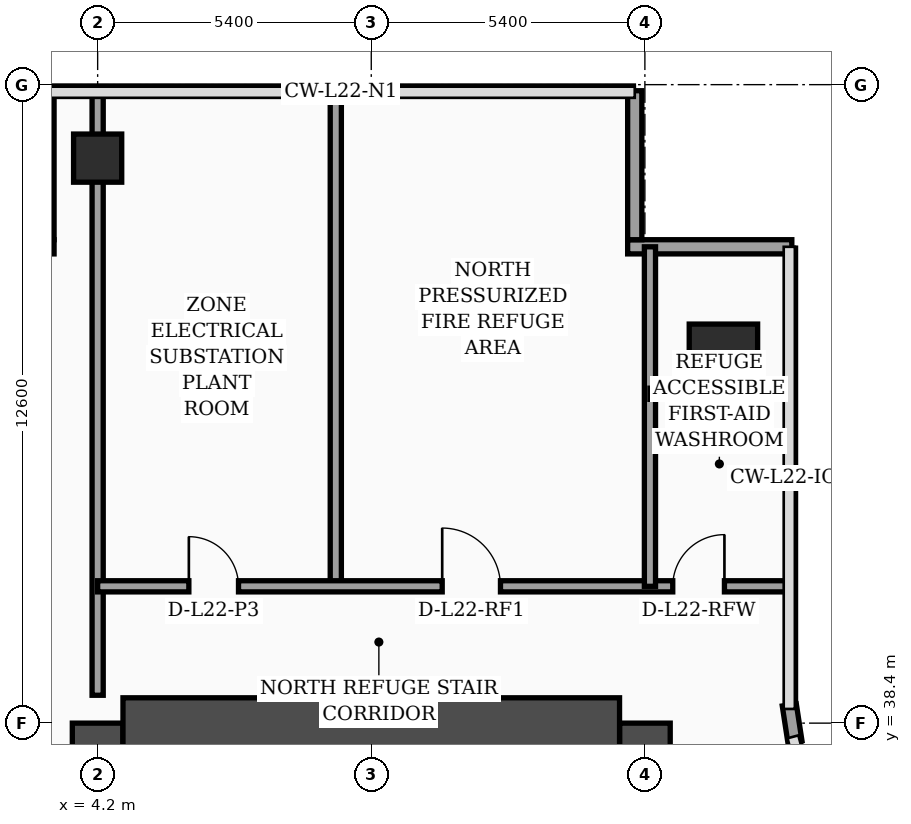
"""IFC4 building model, lengths in metres.
Left out: names, types, materials, properties, quantities, classifications, styles, units other than length and angle.
Written with IfcOpenShell. Run it as: python <this file> out.ifc"""

import sys

from ifc_helpers import new_model, si_unit, direction, frame, frame_2d, origin, origin_2d, place, context, subcontext, project, spatial, rectangle, hollow_rectangle, extrude, element, fill, save


model = new_model("IFC4")
c1 = context("Model", 3, precision=1e-05, world=origin(), true_north=direction((0.0, 1.0)))
c2 = subcontext(c1, "Body", "Model", "MODEL_VIEW")
j1 = project(units=[si_unit("LENGTHUNIT", "METRE"), si_unit("PLANEANGLEUNIT", "RADIAN")], contexts=[c1])
p1 = place(None, origin())
s1 = spatial("IfcSite", under=j1, at=p1, CompositionType="ELEMENT")
p2 = place(p1, origin())
s2 = spatial("IfcBuilding", under=s1, at=p2, CompositionType="ELEMENT")
p3 = place(p2, frame((0.0, 0.0, 92.6)))
s3 = spatial("IfcBuildingStorey", under=s2, at=p3, CompositionType="ELEMENT", Elevation=92.6)
p4 = place(p3, frame((4.2, 16.8, 0.0), z_axis=(0.0, 0.0, 1.0), x_axis=(0.0, 1.0, 0.0)))
e1 = element("IfcWall", 1, at=p4, inside=s3, PredefinedType="SHEAR", context=c2, shape_type="SweptSolid", body=[
    extrude(rectangle(XDim=21.6, YDim=1.0, at=frame_2d((10.8, 0.0))), origin(), (0.0, 0.0, 1.0), 4.35),
])
p5 = place(p3, frame((15.0, 16.8, 0.0), z_axis=(0.0, 0.0, 1.0), x_axis=(0.0, 1.0, 0.0)))
e2 = element("IfcWall", 2, at=p5, inside=s3, PredefinedType="SHEAR", context=c2, shape_type="SweptSolid", body=[
    extrude(rectangle(XDim=21.6, YDim=1.0, at=frame_2d((10.8, 0.0))), origin(), (0.0, 0.0, 1.0), 4.35),
])
p6 = place(p5, frame((8.65, 0.0, 0.0)))
e3 = element("IfcOpeningElement", 3, at=p6, cuts=e2, PredefinedType="OPENING", context=c2, shape_type="SweptSolid", body=[
    extrude(rectangle(XDim=1.1, YDim=2.2, at=frame_2d((0.55, 1.1))), frame((0.0, 0.51, 0.0), z_axis=(0.0, -1.0, 0.0), x_axis=(1.0, 0.0, 0.0)), (0.0, 0.0, 1.0), 1.02),
])
p7 = place(p5, frame((1.25, 0.0, 0.0)))
e4 = element("IfcOpeningElement", 4, at=p7, cuts=e2, PredefinedType="OPENING", context=c2, shape_type="SweptSolid", body=[
    extrude(rectangle(XDim=1.1, YDim=2.2, at=frame_2d((0.55, 1.1))), frame((0.0, 0.51, 0.0), z_axis=(0.0, -1.0, 0.0), x_axis=(1.0, 0.0, 0.0)), (0.0, 0.0, 1.0), 1.02),
])
p8 = place(p5, frame((3.8, 0.0, 0.0)))
e5 = element("IfcOpeningElement", 5, at=p8, cuts=e2, PredefinedType="OPENING", context=c2, shape_type="SweptSolid", body=[
    extrude(rectangle(XDim=1.1, YDim=2.2, at=frame_2d((0.55, 1.1))), frame((0.0, 0.51, 0.0), z_axis=(0.0, -1.0, 0.0), x_axis=(1.0, 0.0, 0.0)), (0.0, 0.0, 1.0), 1.02),
])
p9 = place(p5, frame((6.35, 0.0, 0.0)))
e6 = element("IfcOpeningElement", 6, at=p9, cuts=e2, PredefinedType="OPENING", context=c2, shape_type="SweptSolid", body=[
    extrude(rectangle(XDim=1.1, YDim=2.2, at=frame_2d((0.55, 1.1))), frame((0.0, 0.51, 0.0), z_axis=(0.0, -1.0, 0.0), x_axis=(1.0, 0.0, 0.0)), (0.0, 0.0, 1.0), 1.02),
])
p10 = place(p5, frame((10.85, 0.0, 0.0)))
e7 = element("IfcOpeningElement", 7, at=p10, cuts=e2, PredefinedType="OPENING", context=c2, shape_type="SweptSolid", body=[
    extrude(rectangle(XDim=1.1, YDim=2.2, at=frame_2d((0.55, 1.1))), frame((0.0, 0.51, 0.0), z_axis=(0.0, -1.0, 0.0), x_axis=(1.0, 0.0, 0.0)), (0.0, 0.0, 1.0), 1.02),
])
p11 = place(p5, frame((13.5, 0.0, 0.0)))
e8 = element("IfcOpeningElement", 8, at=p11, cuts=e2, PredefinedType="OPENING", context=c2, shape_type="SweptSolid", body=[
    extrude(rectangle(XDim=1.1, YDim=2.2, at=frame_2d((0.55, 1.1))), frame((0.0, 0.51, 0.0), z_axis=(0.0, -1.0, 0.0), x_axis=(1.0, 0.0, 0.0)), (0.0, 0.0, 1.0), 1.02),
])
p12 = place(p5, frame((16.15, 0.0, 0.0)))
e9 = element("IfcOpeningElement", 9, at=p12, cuts=e2, PredefinedType="OPENING", context=c2, shape_type="SweptSolid", body=[
    extrude(rectangle(XDim=1.1, YDim=2.2, at=frame_2d((0.55, 1.1))), frame((0.0, 0.51, 0.0), z_axis=(0.0, -1.0, 0.0), x_axis=(1.0, 0.0, 0.0)), (0.0, 0.0, 1.0), 1.02),
])
p13 = place(p3, frame((4.7, 38.4, 0.0), z_axis=(0.0, 0.0, 1.0), x_axis=(1.0, 0.0, 0.0)))
e10 = element("IfcWall", 10, at=p13, inside=s3, PredefinedType="SHEAR", context=c2, shape_type="SweptSolid", body=[
    extrude(rectangle(XDim=9.8, YDim=1.0, at=frame_2d((4.9, 0.0))), origin(), (0.0, 0.0, 1.0), 4.35),
])
p14 = place(p3, frame((4.2, 49.55, 0.0), z_axis=(0.0, 0.0, 1.0), x_axis=(1.0, 0.0, 0.0)))
e11 = element("IfcColumn", 11, at=p14, inside=s3, PredefinedType="COLUMN", context=c2, shape_type="SweptSolid", body=[
    extrude(hollow_rectangle(XDim=0.95, YDim=0.95, WallThickness=0.04, at=origin_2d()), origin(), (0.0, 0.0, 1.0), 4.35),
])
p15 = place(p3, frame((16.55, 45.6, 0.0), z_axis=(0.0, 0.0, 1.0), x_axis=(1.0, 0.0, 0.0)))
e12 = element("IfcColumn", 12, at=p15, inside=s3, PredefinedType="COLUMN", context=c2, shape_type="SweptSolid", body=[
    extrude(rectangle(XDim=1.35, YDim=1.35, at=origin_2d()), origin(), (0.0, 0.0, 1.0), 4.35),
])
p16 = place(p3, frame((17.962, 38.03, 0.0), z_axis=(0.0, 0.0, 1.0), x_axis=(-0.15141125477, 0.988470855377, 0.0)))
e13 = element("IfcWall", 13, at=p16, inside=s3, PredefinedType="SOLIDWALL", context=c2, shape_type="SweptSolid", body=[
    extrude(rectangle(XDim=0.739, YDim=0.28, at=frame_2d((0.369, 0.0))), origin(), (0.0, 0.0, 1.0), 4.35),
])
p17 = place(p3, frame((17.9, 47.8, 0.0), z_axis=(0.0, 0.0, 1.0), x_axis=(-1.0, 0.0, 0.0)))
e14 = element("IfcWall", 14, at=p17, inside=s3, PredefinedType="SOLIDWALL", context=c2, shape_type="SweptSolid", body=[
    extrude(rectangle(XDim=3.24, YDim=0.28, at=frame_2d((1.62, 0.0))), origin(), (0.0, 0.0, 1.0), 4.35),
])
p18 = place(p3, frame((14.8, 47.94, 0.0), z_axis=(0.0, 0.0, 1.0), x_axis=(0.0, 1.0, 0.0)))
e15 = element("IfcWall", 15, at=p18, inside=s3, PredefinedType="SOLIDWALL", context=c2, shape_type="SweptSolid", body=[
    extrude(rectangle(XDim=2.94, YDim=0.28, at=frame_2d((1.47, 0.0))), origin(), (0.0, 0.0, 1.0), 4.35),
])
p19 = place(p3, frame((3.2, 50.88, 0.0), z_axis=(0.0, 0.0, 1.0), x_axis=(0.0, -1.0, 0.0)))
e16 = element("IfcWall", 16, at=p19, inside=s3, PredefinedType="SOLIDWALL", context=c2, shape_type="SweptSolid", body=[
    extrude(rectangle(XDim=2.94, YDim=0.28, at=frame_2d((1.47, 0.0))), origin(), (0.0, 0.0, 1.0), 3.85),
])
p20 = place(p3, frame((3.34, 47.8, 0.0), z_axis=(0.0, 0.0, 1.0), x_axis=(-1.0, 0.0, 0.0)))
e17 = element("IfcWall", 17, at=p20, inside=s3, PredefinedType="SOLIDWALL", context=c2, shape_type="SweptSolid", body=[
    extrude(rectangle(XDim=3.22, YDim=0.28, at=frame_2d((1.61, 0.0))), origin(), (0.0, 0.0, 1.0), 3.85),
])
p21 = place(p3, frame((4.2, 38.95, 0.0), z_axis=(0.0, 0.0, 1.0), x_axis=(0.0, 1.0, 0.0)))
e18 = element("IfcWall", 18, at=p21, inside=s3, PredefinedType="SOLIDWALL", context=c2, shape_type="SweptSolid", body=[
    extrude(rectangle(XDim=11.99, YDim=0.22, at=frame_2d((5.995, 0.0))), origin(), (0.0, 0.0, 1.0), 3.65),
])
p22 = place(p3, frame((8.9, 41.1, 0.0), z_axis=(0.0, 0.0, 1.0), x_axis=(0.0, 1.0, 0.0)))
e19 = element("IfcWall", 19, at=p22, inside=s3, PredefinedType="SOLIDWALL", context=c2, shape_type="SweptSolid", body=[
    extrude(rectangle(XDim=9.84, YDim=0.22, at=frame_2d((4.92, 0.0))), origin(), (0.0, 0.0, 1.0), 3.85),
])
p23 = place(p3, frame((4.2, 41.1, 0.0), z_axis=(0.0, 0.0, 1.0), x_axis=(1.0, 0.0, 0.0)))
e20 = element("IfcWall", 20, at=p23, inside=s3, PredefinedType="SOLIDWALL", context=c2, shape_type="SweptSolid", body=[
    extrude(rectangle(XDim=13.65, YDim=0.22, at=frame_2d((6.825, 0.0))), origin(), (0.0, 0.0, 1.0), 3.65),
])
p24 = place(p23, frame((1.8, 0.0, 0.0)))
e21 = element("IfcOpeningElement", 21, at=p24, cuts=e20, PredefinedType="OPENING", context=c2, shape_type="SweptSolid", body=[
    extrude(rectangle(XDim=0.98, YDim=2.15, at=frame_2d((0.49, 1.075))), frame((0.0, 0.12, 0.0), z_axis=(0.0, -1.0, 0.0), x_axis=(1.0, 0.0, 0.0)), (0.0, 0.0, 1.0), 0.24),
])
p25 = place(p23, frame((6.8, 0.0, 0.0)))
e22 = element("IfcOpeningElement", 22, at=p25, cuts=e20, PredefinedType="OPENING", context=c2, shape_type="SweptSolid", body=[
    extrude(rectangle(XDim=1.15, YDim=2.2, at=frame_2d((0.575, 1.1))), frame((0.0, 0.12, 0.0), z_axis=(0.0, -1.0, 0.0), x_axis=(1.0, 0.0, 0.0)), (0.0, 0.0, 1.0), 0.24),
])
p26 = place(p23, frame((11.35, 0.0, 0.0)))
e23 = element("IfcOpeningElement", 23, at=p26, cuts=e20, PredefinedType="OPENING", context=c2, shape_type="SweptSolid", body=[
    extrude(rectangle(XDim=1.02, YDim=2.2, at=frame_2d((0.51, 1.1))), frame((0.0, 0.12, 0.0), z_axis=(0.0, -1.0, 0.0), x_axis=(1.0, 0.0, 0.0)), (0.0, 0.0, 1.0), 0.24),
])
p27 = place(p3, frame((15.1, 41.1, 0.0), z_axis=(0.0, 0.0, 1.0), x_axis=(0.0, 1.0, 0.0)))
e24 = element("IfcWall", 24, at=p27, inside=s3, PredefinedType="SOLIDWALL", context=c2, shape_type="SweptSolid", body=[
    extrude(rectangle(XDim=6.7, YDim=0.22, at=frame_2d((3.35, 0.0))), origin(), (0.0, 0.0, 1.0), 3.65),
])
p28 = place(p3, frame((15.1, 44.9, 0.0), z_axis=(0.0, 0.0, 1.0), x_axis=(1.0, 0.0, 0.0)))
e25 = element("IfcWall", 25, at=p28, inside=s3, PredefinedType="SOLIDWALL", context=c2, shape_type="SweptSolid", body=[
    extrude(rectangle(XDim=2.75, YDim=0.22, at=frame_2d((1.375, 0.0))), origin(), (0.0, 0.0, 1.0), 3.65),
])
p29 = place(p24, origin())
e26 = element("IfcDoor", 26, at=p29, inside=s3, OperationType="SINGLE_SWING_LEFT", PredefinedType="DOOR", context=c2, shape_type="SweptSolid", body=[
    extrude(rectangle(XDim=0.98, YDim=2.15, at=frame_2d((0.49, 1.075))), frame((0.0, 0.025, 0.0), z_axis=(0.0, -1.0, 0.0), x_axis=(1.0, 0.0, 0.0)), (0.0, 0.0, 1.0), 0.05),
])
fill(e21, e26)
p30 = place(p25, origin())
e27 = element("IfcDoor", 27, at=p30, inside=s3, OperationType="SINGLE_SWING_LEFT", PredefinedType="DOOR", context=c2, shape_type="SweptSolid", body=[
    extrude(rectangle(XDim=1.15, YDim=2.2, at=frame_2d((0.575, 1.1))), frame((0.0, 0.025, 0.0), z_axis=(0.0, -1.0, 0.0), x_axis=(1.0, 0.0, 0.0)), (0.0, 0.0, 1.0), 0.05),
])
fill(e22, e27)
p31 = place(p26, origin())
e28 = element("IfcDoor", 28, at=p31, inside=s3, OperationType="SINGLE_SWING_RIGHT", PredefinedType="DOOR", context=c2, shape_type="SweptSolid", body=[
    extrude(rectangle(XDim=1.02, YDim=2.2, at=frame_2d((0.51, 1.1))), frame((0.0, 0.025, 0.0), z_axis=(0.0, -1.0, 0.0), x_axis=(1.0, 0.0, 0.0)), (0.0, 0.0, 1.0), 0.05),
])
fill(e23, e28)
save(model, sys.argv[1])
